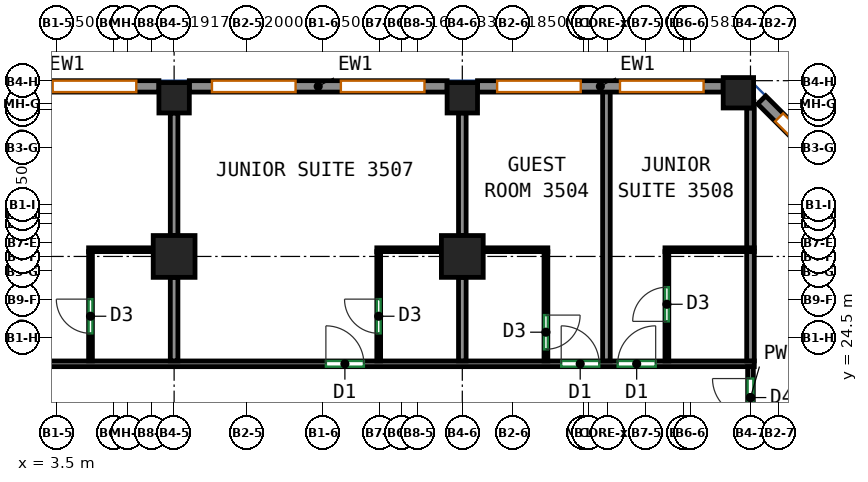
"""IFC4 building model, lengths in metres.
Left out: names, types, materials, properties, quantities, classifications, styles, units other than length and angle.
Written with IfcOpenShell. Run it as: python <this file> out.ifc"""

import sys

from ifc_helpers import new_model, si_unit, direction, frame, frame_2d, origin, origin_2d, place, context, subcontext, project, spatial, rectangle, extrude, source, transform, mapped, element, fill, save


model = new_model("IFC4")
c1 = context("Model", 3, precision=1e-05, world=origin(), true_north=direction((0.0, 1.0)))
c2 = subcontext(c1, "Body", "Model", "MODEL_VIEW")
j1 = project(units=[si_unit("LENGTHUNIT", "METRE"), si_unit("PLANEANGLEUNIT", "RADIAN")], contexts=[c1])
p1 = place(None, origin())
s1 = spatial("IfcSite", under=j1, at=p1, CompositionType="ELEMENT")
p2 = place(p1, origin())
s2 = spatial("IfcBuilding", under=s1, at=p2, CompositionType="ELEMENT")
p3 = place(p2, frame((0.0, 0.0, 154.1)))
s3 = spatial("IfcBuildingStorey", under=s2, at=p3, CompositionType="ELEMENT", Elevation=154.1)
m1 = source(origin(), c2, "Body", "SweptSolid", [
    extrude(rectangle(XDim=1.1, YDim=1.1, at=origin_2d()), origin(), (0.0, 0.0, 1.0), 3.12),
])
p4 = place(p3, frame((6.583, 26.625, 0.0), z_axis=(0.0, 0.0, 1.0), x_axis=(1.0, 0.0, 0.0)))
e1 = element("IfcColumn", 1, at=p4, inside=s3, PredefinedType="COLUMN", context=c2, shape_type="MappedRepresentation", body=[
    mapped(m1, transform((0.0, 0.0, 0.0))),
])
m2 = source(origin(), c2, "Body", "SweptSolid", [
    extrude(rectangle(XDim=0.8, YDim=0.8, at=origin_2d()), origin(), (0.0, 0.0, 1.0), 3.12),
])
p5 = place(p3, frame((6.583, 30.8, 0.0), z_axis=(0.0, 0.0, 1.0), x_axis=(1.0, 0.0, 0.0)))
e2 = element("IfcColumn", 2, at=p5, inside=s3, PredefinedType="COLUMN", context=c2, shape_type="MappedRepresentation", body=[
    mapped(m2, transform((0.0, 0.0, 0.0))),
])
p6 = place(p3, frame((14.167, 26.625, 0.0), z_axis=(0.0, 0.0, 1.0), x_axis=(1.0, 0.0, 0.0)))
e3 = element("IfcColumn", 3, at=p6, inside=s3, PredefinedType="COLUMN", context=c2, shape_type="MappedRepresentation", body=[
    mapped(m1, transform((0.0, 0.0, 0.0))),
])
for number, where, z_axis, x_axis in (
    (4, (14.167, 30.8, 0.0), (0.0, 0.0, 1.0), (1.0, 0.0, 0.0)),
    (5, (21.432, 30.932, 0.0), (0.0, 0.0, 1.0), (1.0, 0.0, 0.0)),
):
    element("IfcColumn", number, at=place(p3, frame(where, z_axis=z_axis, x_axis=x_axis)), inside=s3, PredefinedType="COLUMN", context=c2, shape_type="MappedRepresentation", body=[
        mapped(m2, transform((0.0, 0.0, 0.0))),
    ])
m3 = source(origin(), c2, "Body", "SweptSolid", [
    extrude(rectangle(XDim=3.5, YDim=0.3, at=frame_2d((1.75, 0.0))), origin(), (0.0, 0.0, 1.0), 3.12),
])
p7 = place(p3, frame((24.519, 28.269, 0.0), z_axis=(0.0, 0.0, 1.0), x_axis=(-0.70707190453, 0.707141656123, 0.0)))
e6 = element("IfcWall", 6, at=p7, inside=s3, PredefinedType="SOLIDWALL", context=c2, shape_type="MappedRepresentation", body=[
    mapped(m3, transform((0.0, 0.0, 0.0))),
])
p8 = place(p7, frame((0.65, 0.0, 0.85)))
e7 = element("IfcOpeningElement", 7, at=p8, cuts=e6, PredefinedType="OPENING", context=c2, shape_type="SweptSolid", body=[
    extrude(rectangle(XDim=2.2, YDim=1.95, at=frame_2d((1.1, 0.975))), frame((0.0, 0.16, 0.0), z_axis=(0.0, -1.0, 0.0), x_axis=(1.0, 0.0, 0.0)), (0.0, 0.0, 1.0), 0.32),
])
m4 = source(origin(), c2, "Body", "SweptSolid", [
    extrude(rectangle(XDim=6.465, YDim=0.3, at=frame_2d((3.232, 0.0))), origin(), (0.0, 0.0, 1.0), 3.12),
])
p9 = place(p3, frame((21.032, 31.1, 0.0), z_axis=(0.0, 0.0, 1.0), x_axis=(-1.0, 0.0, 0.0)))
e8 = element("IfcWall", 8, at=p9, inside=s3, PredefinedType="SOLIDWALL", context=c2, shape_type="MappedRepresentation", body=[
    mapped(m4, transform((0.0, 0.0, 0.0))),
])
p10 = place(p9, frame((0.516, 0.0, 0.85)))
e9 = element("IfcOpeningElement", 9, at=p10, cuts=e8, PredefinedType="OPENING", context=c2, shape_type="SweptSolid", body=[
    extrude(rectangle(XDim=2.2, YDim=1.95, at=frame_2d((1.1, 0.975))), frame((0.0, 0.16, 0.0), z_axis=(0.0, -1.0, 0.0), x_axis=(1.0, 0.0, 0.0)), (0.0, 0.0, 1.0), 0.32),
])
p11 = place(p9, frame((3.749, 0.0, 0.85)))
e10 = element("IfcOpeningElement", 10, at=p11, cuts=e8, PredefinedType="OPENING", context=c2, shape_type="SweptSolid", body=[
    extrude(rectangle(XDim=2.2, YDim=1.95, at=frame_2d((1.1, 0.975))), frame((0.0, 0.16, 0.0), z_axis=(0.0, -1.0, 0.0), x_axis=(1.0, 0.0, 0.0)), (0.0, 0.0, 1.0), 0.32),
])
m5 = source(origin(), c2, "Body", "SweptSolid", [
    extrude(rectangle(XDim=6.783, YDim=0.3, at=frame_2d((3.392, 0.0))), origin(), (0.0, 0.0, 1.0), 3.12),
])
p12 = place(p3, frame((13.767, 31.1, 0.0), z_axis=(0.0, 0.0, 1.0), x_axis=(-1.0, 0.0, 0.0)))
e11 = element("IfcWall", 11, at=p12, inside=s3, PredefinedType="SOLIDWALL", context=c2, shape_type="MappedRepresentation", body=[
    mapped(m5, transform((0.0, 0.0, 0.0))),
])
p13 = place(p12, frame((0.596, 0.0, 0.85)))
e12 = element("IfcOpeningElement", 12, at=p13, cuts=e11, PredefinedType="OPENING", context=c2, shape_type="SweptSolid", body=[
    extrude(rectangle(XDim=2.2, YDim=1.95, at=frame_2d((1.1, 0.975))), frame((0.0, 0.16, 0.0), z_axis=(0.0, -1.0, 0.0), x_axis=(1.0, 0.0, 0.0)), (0.0, 0.0, 1.0), 0.32),
])
p14 = place(p12, frame((3.988, 0.0, 0.85)))
e13 = element("IfcOpeningElement", 13, at=p14, cuts=e11, PredefinedType="OPENING", context=c2, shape_type="SweptSolid", body=[
    extrude(rectangle(XDim=2.2, YDim=1.95, at=frame_2d((1.1, 0.975))), frame((0.0, 0.16, 0.0), z_axis=(0.0, -1.0, 0.0), x_axis=(1.0, 0.0, 0.0)), (0.0, 0.0, 1.0), 0.32),
])
m6 = source(origin(), c2, "Body", "SweptSolid", [
    extrude(rectangle(XDim=6.783, YDim=0.3, at=frame_2d((3.392, 0.0))), origin(), (0.0, 0.0, 1.0), 3.12),
])
p15 = place(p3, frame((6.183, 31.1, 0.0), z_axis=(0.0, 0.0, 1.0), x_axis=(-1.0, 0.0, 0.0)))
e14 = element("IfcWall", 14, at=p15, inside=s3, PredefinedType="SOLIDWALL", context=c2, shape_type="MappedRepresentation", body=[
    mapped(m6, transform((0.0, 0.0, 0.0))),
])
p16 = place(p15, frame((0.596, 0.0, 0.85)))
e15 = element("IfcOpeningElement", 15, at=p16, cuts=e14, PredefinedType="OPENING", context=c2, shape_type="SweptSolid", body=[
    extrude(rectangle(XDim=2.2, YDim=1.95, at=frame_2d((1.1, 0.975))), frame((0.0, 0.16, 0.0), z_axis=(0.0, -1.0, 0.0), x_axis=(1.0, 0.0, 0.0)), (0.0, 0.0, 1.0), 0.32),
])
p17 = place(p15, frame((3.988, 0.0, 0.85)))
e16 = element("IfcOpeningElement", 16, at=p17, cuts=e14, PredefinedType="OPENING", context=c2, shape_type="SweptSolid", body=[
    extrude(rectangle(XDim=2.2, YDim=1.95, at=frame_2d((1.1, 0.975))), frame((0.0, 0.16, 0.0), z_axis=(0.0, -1.0, 0.0), x_axis=(1.0, 0.0, 0.0)), (0.0, 0.0, 1.0), 0.32),
])
p18 = place(p3, frame((-20.059, 23.8, 0.0), z_axis=(0.0, 0.0, 1.0), x_axis=(1.0, 0.0, 0.0)))
e17 = element("IfcWall", 17, at=p18, inside=s3, PredefinedType="PARTITIONING", context=c2, shape_type="SweptSolid", body=[
    extrude(rectangle(XDim=41.909, YDim=0.15, at=frame_2d((20.955, 0.0))), origin(), (0.0, 0.0, 1.0), 3.12),
])
p19 = place(p18, frame((5.293, 0.0, 0.0)))
e18 = element("IfcOpeningElement", 18, at=p19, cuts=e17, PredefinedType="OPENING", context=c2, shape_type="SweptSolid", body=[
    extrude(rectangle(XDim=1.0, YDim=2.1, at=frame_2d((0.5, 1.05))), frame((0.0, 0.085, 0.0), z_axis=(0.0, -1.0, 0.0), x_axis=(1.0, 0.0, 0.0)), (0.0, 0.0, 1.0), 0.17),
])
p20 = place(p18, frame((9.275, 0.0, 0.0)))
e19 = element("IfcOpeningElement", 19, at=p20, cuts=e17, PredefinedType="OPENING", context=c2, shape_type="SweptSolid", body=[
    extrude(rectangle(XDim=1.0, YDim=2.1, at=frame_2d((0.5, 1.05))), frame((0.0, 0.085, 0.0), z_axis=(0.0, -1.0, 0.0), x_axis=(1.0, 0.0, 0.0)), (0.0, 0.0, 1.0), 0.17),
])
p21 = place(p18, frame((18.292, 0.0, 0.0)))
e20 = element("IfcOpeningElement", 20, at=p21, cuts=e17, PredefinedType="OPENING", context=c2, shape_type="SweptSolid", body=[
    extrude(rectangle(XDim=1.0, YDim=2.1, at=frame_2d((0.5, 1.05))), frame((0.0, 0.085, 0.0), z_axis=(0.0, -1.0, 0.0), x_axis=(1.0, 0.0, 0.0)), (0.0, 0.0, 1.0), 0.17),
])
p22 = place(p18, frame((30.636, 0.0, 0.0)))
e21 = element("IfcOpeningElement", 21, at=p22, cuts=e17, PredefinedType="OPENING", context=c2, shape_type="SweptSolid", body=[
    extrude(rectangle(XDim=1.0, YDim=2.1, at=frame_2d((0.5, 1.05))), frame((0.0, 0.085, 0.0), z_axis=(0.0, -1.0, 0.0), x_axis=(1.0, 0.0, 0.0)), (0.0, 0.0, 1.0), 0.17),
])
p23 = place(p18, frame((36.828, 0.0, 0.0)))
e22 = element("IfcOpeningElement", 22, at=p23, cuts=e17, PredefinedType="OPENING", context=c2, shape_type="SweptSolid", body=[
    extrude(rectangle(XDim=1.0, YDim=2.1, at=frame_2d((0.5, 1.05))), frame((0.0, 0.085, 0.0), z_axis=(0.0, -1.0, 0.0), x_axis=(1.0, 0.0, 0.0)), (0.0, 0.0, 1.0), 0.17),
])
p24 = place(p18, frame((38.314, 0.0, 0.0)))
e23 = element("IfcOpeningElement", 23, at=p24, cuts=e17, PredefinedType="OPENING", context=c2, shape_type="SweptSolid", body=[
    extrude(rectangle(XDim=1.0, YDim=2.1, at=frame_2d((0.5, 1.05))), frame((0.0, 0.085, 0.0), z_axis=(0.0, -1.0, 0.0), x_axis=(1.0, 0.0, 0.0)), (0.0, 0.0, 1.0), 0.17),
])
p25 = place(p3, frame((21.75, 22.1, 0.0), z_axis=(0.0, 0.0, 1.0), x_axis=(0.0, 1.0, 0.0)))
e24 = element("IfcWall", 24, at=p25, inside=s3, PredefinedType="PARTITIONING", context=c2, shape_type="SweptSolid", body=[
    extrude(rectangle(XDim=1.625, YDim=0.15, at=frame_2d((0.812, 0.0))), origin(), (0.0, 0.0, 1.0), 3.12),
])
p26 = place(p25, frame((0.312, 0.0, 0.0)))
e25 = element("IfcOpeningElement", 25, at=p26, cuts=e24, PredefinedType="OPENING", context=c2, shape_type="SweptSolid", body=[
    extrude(rectangle(XDim=1.0, YDim=2.1, at=frame_2d((0.5, 1.05))), frame((0.0, 0.085, 0.0), z_axis=(0.0, -1.0, 0.0), x_axis=(1.0, 0.0, 0.0)), (0.0, 0.0, 1.0), 0.17),
])
p27 = place(p3, frame((4.333, 26.802, 0.0), z_axis=(0.0, 0.0, 1.0), x_axis=(1.0, 0.0, 0.0)))
e26 = element("IfcWall", 26, at=p27, inside=s3, PredefinedType="PARTITIONING", context=c2, shape_type="SweptSolid", body=[
    extrude(rectangle(XDim=1.7, YDim=0.1, at=frame_2d((0.85, 0.0))), origin(), (0.0, 0.0, 1.0), 3.12),
])
p28 = place(p3, frame((4.383, 23.877, 0.0), z_axis=(0.0, 0.0, 1.0), x_axis=(0.0, 1.0, 0.0)))
e27 = element("IfcWall", 27, at=p28, inside=s3, PredefinedType="PARTITIONING", context=c2, shape_type="SweptSolid", body=[
    extrude(rectangle(XDim=2.875, YDim=0.1, at=frame_2d((1.438, 0.0))), origin(), (0.0, 0.0, 1.0), 3.12),
])
p29 = place(p28, frame((0.725, 0.0, 0.0)))
e28 = element("IfcOpeningElement", 28, at=p29, cuts=e27, PredefinedType="OPENING", context=c2, shape_type="SweptSolid", body=[
    extrude(rectangle(XDim=0.9, YDim=2.1, at=frame_2d((0.45, 1.05))), frame((0.0, 0.06, 0.0), z_axis=(0.0, -1.0, 0.0), x_axis=(1.0, 0.0, 0.0)), (0.0, 0.0, 1.0), 0.12),
])
p30 = place(p3, frame((6.583, 27.175, 0.0), z_axis=(0.0, 0.0, 1.0), x_axis=(0.0, 1.0, 0.0)))
e29 = element("IfcWall", 29, at=p30, inside=s3, PredefinedType="PARTITIONING", context=c2, shape_type="SweptSolid", body=[
    extrude(rectangle(XDim=3.225, YDim=0.2, at=frame_2d((1.612, 0.0))), origin(), (0.0, 0.0, 1.0), 3.12),
])
p31 = place(p3, frame((6.583, 23.877, 0.0), z_axis=(0.0, 0.0, 1.0), x_axis=(0.0, 1.0, 0.0)))
e30 = element("IfcWall", 30, at=p31, inside=s3, PredefinedType="PARTITIONING", context=c2, shape_type="SweptSolid", body=[
    extrude(rectangle(XDim=2.198, YDim=0.2, at=frame_2d((1.099, 0.0))), origin(), (0.0, 0.0, 1.0), 3.12),
])
p32 = place(p3, frame((11.917, 26.802, 0.0), z_axis=(0.0, 0.0, 1.0), x_axis=(1.0, 0.0, 0.0)))
e31 = element("IfcWall", 31, at=p32, inside=s3, PredefinedType="PARTITIONING", context=c2, shape_type="SweptSolid", body=[
    extrude(rectangle(XDim=1.7, YDim=0.1, at=frame_2d((0.85, 0.0))), origin(), (0.0, 0.0, 1.0), 3.12),
])
p33 = place(p3, frame((11.967, 23.877, 0.0), z_axis=(0.0, 0.0, 1.0), x_axis=(0.0, 1.0, 0.0)))
e32 = element("IfcWall", 32, at=p33, inside=s3, PredefinedType="PARTITIONING", context=c2, shape_type="SweptSolid", body=[
    extrude(rectangle(XDim=2.875, YDim=0.1, at=frame_2d((1.438, 0.0))), origin(), (0.0, 0.0, 1.0), 3.12),
])
p34 = place(p33, frame((0.725, 0.0, 0.0)))
e33 = element("IfcOpeningElement", 33, at=p34, cuts=e32, PredefinedType="OPENING", context=c2, shape_type="SweptSolid", body=[
    extrude(rectangle(XDim=0.9, YDim=2.1, at=frame_2d((0.45, 1.05))), frame((0.0, 0.06, 0.0), z_axis=(0.0, -1.0, 0.0), x_axis=(1.0, 0.0, 0.0)), (0.0, 0.0, 1.0), 0.12),
])
p35 = place(p3, frame((14.167, 27.175, 0.0), z_axis=(0.0, 0.0, 1.0), x_axis=(0.0, 1.0, 0.0)))
e34 = element("IfcWall", 34, at=p35, inside=s3, PredefinedType="PARTITIONING", context=c2, shape_type="SweptSolid", body=[
    extrude(rectangle(XDim=3.225, YDim=0.2, at=frame_2d((1.612, 0.0))), origin(), (0.0, 0.0, 1.0), 3.12),
])
p36 = place(p3, frame((14.167, 23.877, 0.0), z_axis=(0.0, 0.0, 1.0), x_axis=(0.0, 1.0, 0.0)))
e35 = element("IfcWall", 35, at=p36, inside=s3, PredefinedType="PARTITIONING", context=c2, shape_type="SweptSolid", body=[
    extrude(rectangle(XDim=2.198, YDim=0.2, at=frame_2d((1.099, 0.0))), origin(), (0.0, 0.0, 1.0), 3.12),
])
p37 = place(p3, frame((14.717, 26.802, 0.0), z_axis=(0.0, 0.0, 1.0), x_axis=(1.0, 0.0, 0.0)))
e36 = element("IfcWall", 36, at=p37, inside=s3, PredefinedType="PARTITIONING", context=c2, shape_type="SweptSolid", body=[
    extrude(rectangle(XDim=1.7, YDim=0.1, at=frame_2d((0.85, 0.0))), origin(), (0.0, 0.0, 1.0), 3.12),
])
p38 = place(p3, frame((16.367, 26.752, 0.0), z_axis=(0.0, 0.0, 1.0), x_axis=(0.0, -1.0, 0.0)))
e37 = element("IfcWall", 37, at=p38, inside=s3, PredefinedType="PARTITIONING", context=c2, shape_type="SweptSolid", body=[
    extrude(rectangle(XDim=2.875, YDim=0.1, at=frame_2d((1.438, 0.0))), origin(), (0.0, 0.0, 1.0), 3.12),
])
p39 = place(p38, frame((1.67, 0.0, 0.0)))
e38 = element("IfcOpeningElement", 38, at=p39, cuts=e37, PredefinedType="OPENING", context=c2, shape_type="SweptSolid", body=[
    extrude(rectangle(XDim=0.9, YDim=2.1, at=frame_2d((0.45, 1.05))), frame((0.0, 0.06, 0.0), z_axis=(0.0, -1.0, 0.0), x_axis=(1.0, 0.0, 0.0)), (0.0, 0.0, 1.0), 0.12),
])
p40 = place(p3, frame((17.959, 23.877, 0.0), z_axis=(0.0, 0.0, 1.0), x_axis=(0.0, 1.0, 0.0)))
e39 = element("IfcWall", 39, at=p40, inside=s3, PredefinedType="PARTITIONING", context=c2, shape_type="SweptSolid", body=[
    extrude(rectangle(XDim=7.123, YDim=0.2, at=frame_2d((3.562, 0.0))), origin(), (0.0, 0.0, 1.0), 3.12),
])
p41 = place(p3, frame((19.5, 26.802, 0.0), z_axis=(0.0, 0.0, 1.0), x_axis=(1.0, 0.0, 0.0)))
e40 = element("IfcWall", 40, at=p41, inside=s3, PredefinedType="PARTITIONING", context=c2, shape_type="SweptSolid", body=[
    extrude(rectangle(XDim=2.35, YDim=0.1, at=frame_2d((1.175, 0.0))), origin(), (0.0, 0.0, 1.0), 3.12),
])
p42 = place(p3, frame((19.55, 23.877, 0.0), z_axis=(0.0, 0.0, 1.0), x_axis=(0.0, 1.0, 0.0)))
e41 = element("IfcWall", 41, at=p42, inside=s3, PredefinedType="PARTITIONING", context=c2, shape_type="SweptSolid", body=[
    extrude(rectangle(XDim=2.875, YDim=0.1, at=frame_2d((1.438, 0.0))), origin(), (0.0, 0.0, 1.0), 3.12),
])
p43 = place(p42, frame((1.04, 0.0, 0.0)))
e42 = element("IfcOpeningElement", 42, at=p43, cuts=e41, PredefinedType="OPENING", context=c2, shape_type="SweptSolid", body=[
    extrude(rectangle(XDim=0.9, YDim=2.1, at=frame_2d((0.45, 1.05))), frame((0.0, 0.06, 0.0), z_axis=(0.0, -1.0, 0.0), x_axis=(1.0, 0.0, 0.0)), (0.0, 0.0, 1.0), 0.12),
])
p44 = place(p3, frame((21.75, 26.852, 0.0), z_axis=(0.0, 0.0, 1.0), x_axis=(0.0, 1.0, 0.0)))
e43 = element("IfcWall", 43, at=p44, inside=s3, PredefinedType="PARTITIONING", context=c2, shape_type="SweptSolid", body=[
    extrude(rectangle(XDim=3.68, YDim=0.2, at=frame_2d((1.84, 0.0))), origin(), (0.0, 0.0, 1.0), 3.12),
])
p45 = place(p3, frame((21.75, 23.877, 0.0), z_axis=(0.0, 0.0, 1.0), x_axis=(0.0, 1.0, 0.0)))
e44 = element("IfcWall", 44, at=p45, inside=s3, PredefinedType="PARTITIONING", context=c2, shape_type="SweptSolid", body=[
    extrude(rectangle(XDim=2.875, YDim=0.2, at=frame_2d((1.438, 0.0))), origin(), (0.0, 0.0, 1.0), 3.12),
])
p46 = place(p8, origin())
e45 = element("IfcWindow", 45, at=p46, inside=s3, PartitioningType="SINGLE_PANEL", PredefinedType="WINDOW", context=c2, shape_type="SweptSolid", body=[
    extrude(rectangle(XDim=2.2, YDim=1.95, at=frame_2d((1.1, 0.975))), frame((0.0, 0.03, 0.0), z_axis=(0.0, -1.0, 0.0), x_axis=(1.0, 0.0, 0.0)), (0.0, 0.0, 1.0), 0.06),
])
fill(e7, e45)
p47 = place(p10, origin())
e46 = element("IfcWindow", 46, at=p47, inside=s3, PartitioningType="SINGLE_PANEL", PredefinedType="WINDOW", context=c2, shape_type="SweptSolid", body=[
    extrude(rectangle(XDim=2.2, YDim=1.95, at=frame_2d((1.1, 0.975))), frame((0.0, 0.03, 0.0), z_axis=(0.0, -1.0, 0.0), x_axis=(1.0, 0.0, 0.0)), (0.0, 0.0, 1.0), 0.06),
])
fill(e9, e46)
p48 = place(p11, origin())
e47 = element("IfcWindow", 47, at=p48, inside=s3, PartitioningType="SINGLE_PANEL", PredefinedType="WINDOW", context=c2, shape_type="SweptSolid", body=[
    extrude(rectangle(XDim=2.2, YDim=1.95, at=frame_2d((1.1, 0.975))), frame((0.0, 0.03, 0.0), z_axis=(0.0, -1.0, 0.0), x_axis=(1.0, 0.0, 0.0)), (0.0, 0.0, 1.0), 0.06),
])
fill(e10, e47)
p49 = place(p13, origin())
e48 = element("IfcWindow", 48, at=p49, inside=s3, PartitioningType="SINGLE_PANEL", PredefinedType="WINDOW", context=c2, shape_type="SweptSolid", body=[
    extrude(rectangle(XDim=2.2, YDim=1.95, at=frame_2d((1.1, 0.975))), frame((0.0, 0.03, 0.0), z_axis=(0.0, -1.0, 0.0), x_axis=(1.0, 0.0, 0.0)), (0.0, 0.0, 1.0), 0.06),
])
fill(e12, e48)
p50 = place(p14, origin())
e49 = element("IfcWindow", 49, at=p50, inside=s3, PartitioningType="SINGLE_PANEL", PredefinedType="WINDOW", context=c2, shape_type="SweptSolid", body=[
    extrude(rectangle(XDim=2.2, YDim=1.95, at=frame_2d((1.1, 0.975))), frame((0.0, 0.03, 0.0), z_axis=(0.0, -1.0, 0.0), x_axis=(1.0, 0.0, 0.0)), (0.0, 0.0, 1.0), 0.06),
])
fill(e13, e49)
p51 = place(p16, origin())
e50 = element("IfcWindow", 50, at=p51, inside=s3, PartitioningType="SINGLE_PANEL", PredefinedType="WINDOW", context=c2, shape_type="SweptSolid", body=[
    extrude(rectangle(XDim=2.2, YDim=1.95, at=frame_2d((1.1, 0.975))), frame((0.0, 0.03, 0.0), z_axis=(0.0, -1.0, 0.0), x_axis=(1.0, 0.0, 0.0)), (0.0, 0.0, 1.0), 0.06),
])
fill(e15, e50)
p52 = place(p26, origin())
e51 = element("IfcDoor", 51, at=p52, inside=s3, OperationType="SINGLE_SWING_RIGHT", PredefinedType="DOOR", context=c2, shape_type="SweptSolid", body=[
    extrude(rectangle(XDim=1.0, YDim=2.1, at=frame_2d((0.5, 1.05))), frame((0.0, 0.025, 0.0), z_axis=(0.0, -1.0, 0.0), x_axis=(1.0, 0.0, 0.0)), (0.0, 0.0, 1.0), 0.05),
])
fill(e25, e51)
p53 = place(p22, origin())
e52 = element("IfcDoor", 52, at=p53, inside=s3, OperationType="SINGLE_SWING_LEFT", PredefinedType="DOOR", context=c2, shape_type="SweptSolid", body=[
    extrude(rectangle(XDim=1.0, YDim=2.1, at=frame_2d((0.5, 1.05))), frame((0.0, 0.025, 0.0), z_axis=(0.0, -1.0, 0.0), x_axis=(1.0, 0.0, 0.0)), (0.0, 0.0, 1.0), 0.05),
])
fill(e21, e52)
p54 = place(p23, origin())
e53 = element("IfcDoor", 53, at=p54, inside=s3, OperationType="SINGLE_SWING_LEFT", PredefinedType="DOOR", context=c2, shape_type="SweptSolid", body=[
    extrude(rectangle(XDim=1.0, YDim=2.1, at=frame_2d((0.5, 1.05))), frame((0.0, 0.025, 0.0), z_axis=(0.0, -1.0, 0.0), x_axis=(1.0, 0.0, 0.0)), (0.0, 0.0, 1.0), 0.05),
])
fill(e22, e53)
p55 = place(p24, origin())
e54 = element("IfcDoor", 54, at=p55, inside=s3, OperationType="SINGLE_SWING_RIGHT", PredefinedType="DOOR", context=c2, shape_type="SweptSolid", body=[
    extrude(rectangle(XDim=1.0, YDim=2.1, at=frame_2d((0.5, 1.05))), frame((0.0, 0.025, 0.0), z_axis=(0.0, -1.0, 0.0), x_axis=(1.0, 0.0, 0.0)), (0.0, 0.0, 1.0), 0.05),
])
fill(e23, e54)
p56 = place(p39, origin())
e55 = element("IfcDoor", 55, at=p56, inside=s3, OperationType="SINGLE_SWING_LEFT", PredefinedType="DOOR", context=c2, shape_type="SweptSolid", body=[
    extrude(rectangle(XDim=0.9, YDim=2.1, at=frame_2d((0.45, 1.05))), frame((0.0, 0.025, 0.0), z_axis=(0.0, -1.0, 0.0), x_axis=(1.0, 0.0, 0.0)), (0.0, 0.0, 1.0), 0.05),
])
fill(e38, e55)
p57 = place(p29, origin())
e56 = element("IfcDoor", 56, at=p57, inside=s3, OperationType="SINGLE_SWING_RIGHT", PredefinedType="DOOR", context=c2, shape_type="SweptSolid", body=[
    extrude(rectangle(XDim=0.9, YDim=2.1, at=frame_2d((0.45, 1.05))), frame((0.0, 0.025, 0.0), z_axis=(0.0, -1.0, 0.0), x_axis=(1.0, 0.0, 0.0)), (0.0, 0.0, 1.0), 0.05),
])
fill(e28, e56)
p58 = place(p34, origin())
e57 = element("IfcDoor", 57, at=p58, inside=s3, OperationType="SINGLE_SWING_RIGHT", PredefinedType="DOOR", context=c2, shape_type="SweptSolid", body=[
    extrude(rectangle(XDim=0.9, YDim=2.1, at=frame_2d((0.45, 1.05))), frame((0.0, 0.025, 0.0), z_axis=(0.0, -1.0, 0.0), x_axis=(1.0, 0.0, 0.0)), (0.0, 0.0, 1.0), 0.05),
])
fill(e33, e57)
p59 = place(p43, origin())
e58 = element("IfcDoor", 58, at=p59, inside=s3, OperationType="SINGLE_SWING_LEFT", PredefinedType="DOOR", context=c2, shape_type="SweptSolid", body=[
    extrude(rectangle(XDim=0.9, YDim=2.1, at=frame_2d((0.45, 1.05))), frame((0.0, 0.025, 0.0), z_axis=(0.0, -1.0, 0.0), x_axis=(1.0, 0.0, 0.0)), (0.0, 0.0, 1.0), 0.05),
])
fill(e42, e58)
save(model, sys.argv[1])
